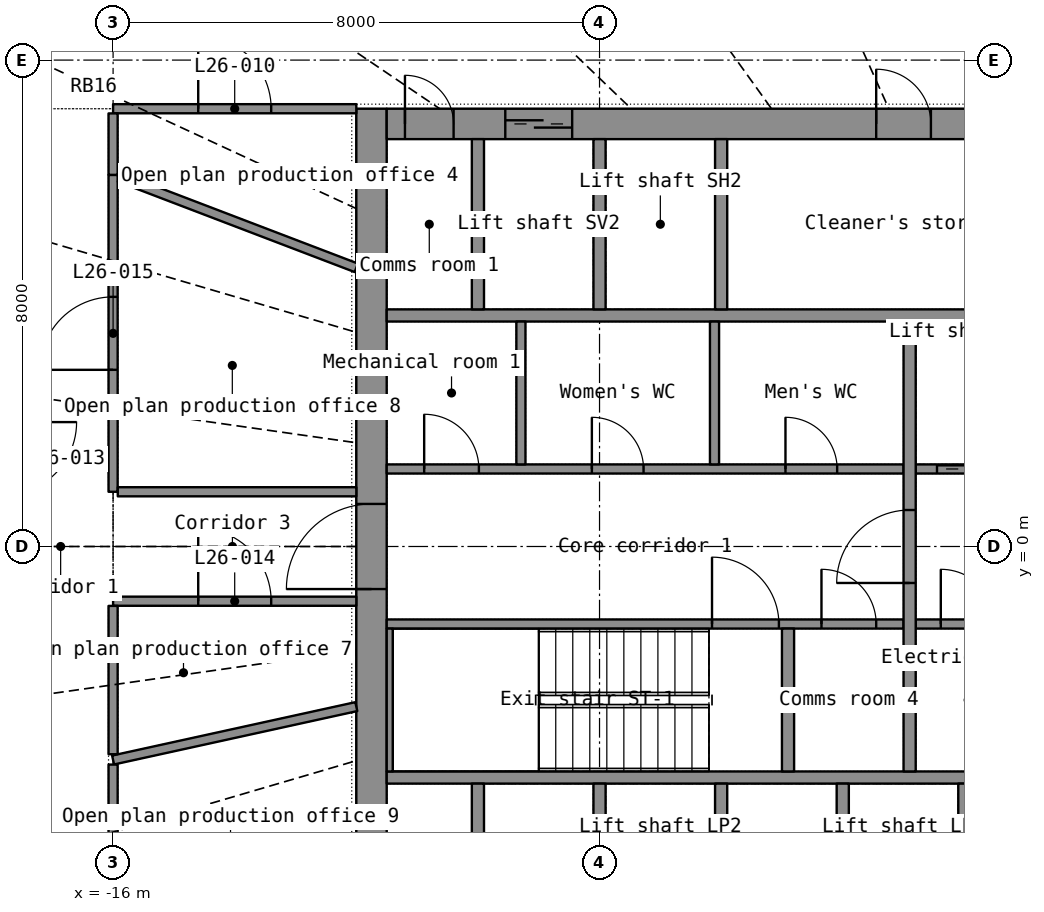
"""IFC4 building model, lengths in metres.
Left out: names, types, materials, properties, quantities, classifications, styles, units other than length and angle.
Written with IfcOpenShell. Run it as: python <this file> out.ifc"""

import sys

from ifc_helpers import new_model, si_unit, direction, frame, frame_2d, origin, place, context, subcontext, project, spatial, rectangle, extrude, element, fill, save


model = new_model("IFC4")
c1 = context("Model", 3, precision=1e-05, world=origin(), true_north=direction((0.0, 1.0)))
c2 = subcontext(c1, "Body", "Model", "MODEL_VIEW")
j1 = project(units=[si_unit("LENGTHUNIT", "METRE"), si_unit("PLANEANGLEUNIT", "RADIAN")], contexts=[c1])
p1 = place(None, origin())
s1 = spatial("IfcSite", under=j1, at=p1, CompositionType="ELEMENT")
p2 = place(p1, origin())
s2 = spatial("IfcBuilding", under=s1, at=p2, CompositionType="ELEMENT")
p3 = place(p2, frame((0.0, 0.0, 111.9)))
s3 = spatial("IfcBuildingStorey", under=s2, at=p3, CompositionType="ELEMENT", Elevation=111.9)
p4 = place(p3, frame((-11.75, -7.2, 0.0), z_axis=(0.0, 0.0, 1.0), x_axis=(0.0, 1.0, 0.0)))
e1 = element("IfcWall", 1, at=p4, inside=s3, PredefinedType="SHEAR", context=c2, shape_type="SweptSolid", body=[
    extrude(rectangle(XDim=14.4, YDim=0.5, at=frame_2d((7.2, 0.0))), origin(), (0.0, 0.0, 1.0), 3.3),
])
p5 = place(p4, frame((6.5, 0.0, 0.0)))
e2 = element("IfcOpeningElement", 2, at=p5, cuts=e1, PredefinedType="OPENING", context=c2, shape_type="SweptSolid", body=[
    extrude(rectangle(XDim=1.4, YDim=2.2, at=frame_2d((0.7, 1.1))), frame((0.0, 0.26, 0.0), z_axis=(0.0, -1.0, 0.0), x_axis=(1.0, 0.0, 0.0)), (0.0, 0.0, 1.0), 0.52),
])
p6 = place(p3, frame((-11.5, 6.95, 0.0), z_axis=(0.0, 0.0, 1.0), x_axis=(1.0, 0.0, 0.0)))
e3 = element("IfcWall", 3, at=p6, inside=s3, PredefinedType="SHEAR", context=c2, shape_type="SweptSolid", body=[
    extrude(rectangle(XDim=23.0, YDim=0.5, at=frame_2d((11.5, 0.0))), origin(), (0.0, 0.0, 1.0), 3.3),
])
p7 = place(p6, frame((1.95, 0.0, 0.0)))
e4 = element("IfcOpeningElement", 4, at=p7, cuts=e3, PredefinedType="OPENING", context=c2, shape_type="SweptSolid", body=[
    extrude(rectangle(XDim=1.1, YDim=2.2, at=frame_2d((0.55, 1.1))), frame((0.0, 0.26, 0.0), z_axis=(0.0, -1.0, 0.0), x_axis=(1.0, 0.0, 0.0)), (0.0, 0.0, 1.0), 0.52),
])
p8 = place(p6, frame((8.05, 0.0, 0.0)))
e5 = element("IfcOpeningElement", 5, at=p8, cuts=e3, PredefinedType="OPENING", context=c2, shape_type="SweptSolid", body=[
    extrude(rectangle(XDim=0.9, YDim=2.1, at=frame_2d((0.45, 1.05))), frame((0.0, 0.26, 0.0), z_axis=(0.0, -1.0, 0.0), x_axis=(1.0, 0.0, 0.0)), (0.0, 0.0, 1.0), 0.52),
])
p9 = place(p6, frame((13.05, 0.0, 0.0)))
e6 = element("IfcOpeningElement", 6, at=p9, cuts=e3, PredefinedType="OPENING", context=c2, shape_type="SweptSolid", body=[
    extrude(rectangle(XDim=0.9, YDim=2.1, at=frame_2d((0.45, 1.05))), frame((0.0, 0.26, 0.0), z_axis=(0.0, -1.0, 0.0), x_axis=(1.0, 0.0, 0.0)), (0.0, 0.0, 1.0), 0.52),
])
p10 = place(p6, frame((18.05, 0.0, 0.0)))
e7 = element("IfcOpeningElement", 7, at=p10, cuts=e3, PredefinedType="OPENING", context=c2, shape_type="SweptSolid", body=[
    extrude(rectangle(XDim=0.9, YDim=2.1, at=frame_2d((0.45, 1.05))), frame((0.0, 0.26, 0.0), z_axis=(0.0, -1.0, 0.0), x_axis=(1.0, 0.0, 0.0)), (0.0, 0.0, 1.0), 0.52),
])
p11 = place(p6, frame((0.3, 0.0, 0.0)))
e8 = element("IfcOpeningElement", 8, at=p11, cuts=e3, PredefinedType="OPENING", context=c2, shape_type="SweptSolid", body=[
    extrude(rectangle(XDim=0.8, YDim=2.05, at=frame_2d((0.4, 1.025))), frame((0.0, 0.26, 0.0), z_axis=(0.0, -1.0, 0.0), x_axis=(1.0, 0.0, 0.0)), (0.0, 0.0, 1.0), 0.52),
])
p12 = place(p6, frame((21.9, 0.0, 0.0)))
e9 = element("IfcOpeningElement", 9, at=p12, cuts=e3, PredefinedType="OPENING", context=c2, shape_type="SweptSolid", body=[
    extrude(rectangle(XDim=0.8, YDim=2.05, at=frame_2d((0.4, 1.025))), frame((0.0, 0.26, 0.0), z_axis=(0.0, -1.0, 0.0), x_axis=(1.0, 0.0, 0.0)), (0.0, 0.0, 1.0), 0.52),
])
for number, where, z_axis, x_axis in (
    (10, (-11.5, -3.8, 0.0), (0.0, 0.0, 1.0), (1.0, 0.0, 0.0)),
    (11, (-11.5, 3.8, 0.0), (0.0, 0.0, 1.0), (1.0, 0.0, 0.0)),
):
    element("IfcWall", number, at=place(p3, frame(where, z_axis=z_axis, x_axis=x_axis)), inside=s3, PredefinedType="SHEAR", context=c2, shape_type="SweptSolid", body=[
        extrude(rectangle(XDim=23.0, YDim=0.2, at=frame_2d((11.5, 0.0))), origin(), (0.0, 0.0, 1.0), 3.3),
    ])
for number, where, z_axis, x_axis in (
    (12, (-10.0, -6.7, 0.0), (0.0, 0.0, 1.0), (0.0, 1.0, 0.0)),
    (13, (-8.0, -6.7, 0.0), (0.0, 0.0, 1.0), (0.0, 1.0, 0.0)),
    (14, (-6.0, -6.7, 0.0), (0.0, 0.0, 1.0), (0.0, 1.0, 0.0)),
    (15, (-4.0, -6.7, 0.0), (0.0, 0.0, 1.0), (0.0, 1.0, 0.0)),
    (16, (-2.0, -6.7, 0.0), (0.0, 0.0, 1.0), (0.0, 1.0, 0.0)),
    (17, (-10.0, 3.9, 0.0), (0.0, 0.0, 1.0), (0.0, 1.0, 0.0)),
    (18, (-8.0, 3.9, 0.0), (0.0, 0.0, 1.0), (0.0, 1.0, 0.0)),
    (19, (-6.0, 3.9, 0.0), (0.0, 0.0, 1.0), (0.0, 1.0, 0.0)),
):
    element("IfcWall", number, at=place(p3, frame(where, z_axis=z_axis, x_axis=x_axis)), inside=s3, PredefinedType="SHEAR", context=c2, shape_type="SweptSolid", body=[
        extrude(rectangle(XDim=2.8, YDim=0.2, at=frame_2d((1.4, 0.0))), origin(), (0.0, 0.0, 1.0), 3.3),
    ])
p13 = place(p3, frame((-11.5, -1.275, 0.0), z_axis=(0.0, 0.0, 1.0), x_axis=(1.0, 0.0, 0.0)))
e20 = element("IfcWall", 20, at=p13, inside=s3, PredefinedType="SHEAR", context=c2, shape_type="SweptSolid", body=[
    extrude(rectangle(XDim=8.5, YDim=0.15, at=frame_2d((4.25, 0.0))), origin(), (0.0, 0.0, 1.0), 3.3),
])
p14 = place(p13, frame((5.35, 0.0, 0.0)))
e21 = element("IfcOpeningElement", 21, at=p14, cuts=e20, PredefinedType="OPENING", context=c2, shape_type="SweptSolid", body=[
    extrude(rectangle(XDim=1.1, YDim=2.15, at=frame_2d((0.55, 1.075))), frame((0.0, 0.085, 0.0), z_axis=(0.0, -1.0, 0.0), x_axis=(1.0, 0.0, 0.0)), (0.0, 0.0, 1.0), 0.17),
])
p15 = place(p13, frame((7.15, 0.0, 0.0)))
e22 = element("IfcOpeningElement", 22, at=p15, cuts=e20, PredefinedType="OPENING", context=c2, shape_type="SweptSolid", body=[
    extrude(rectangle(XDim=0.9, YDim=2.1, at=frame_2d((0.45, 1.05))), frame((0.0, 0.085, 0.0), z_axis=(0.0, -1.0, 0.0), x_axis=(1.0, 0.0, 0.0)), (0.0, 0.0, 1.0), 0.17),
])
p16 = place(p3, frame((-2.8, -1.275, 0.0), z_axis=(0.0, 0.0, 1.0), x_axis=(1.0, 0.0, 0.0)))
e23 = element("IfcWall", 23, at=p16, inside=s3, PredefinedType="SHEAR", context=c2, shape_type="SweptSolid", body=[
    extrude(rectangle(XDim=5.6, YDim=0.15, at=frame_2d((2.8, 0.0))), origin(), (0.0, 0.0, 1.0), 3.3),
])
p17 = place(p16, frame((4.15, 0.0, 0.0)))
e24 = element("IfcOpeningElement", 24, at=p17, cuts=e23, PredefinedType="OPENING", context=c2, shape_type="SweptSolid", body=[
    extrude(rectangle(XDim=1.1, YDim=2.2, at=frame_2d((0.55, 1.1))), frame((0.0, 0.085, 0.0), z_axis=(0.0, -1.0, 0.0), x_axis=(1.0, 0.0, 0.0)), (0.0, 0.0, 1.0), 0.17),
])
p18 = place(p16, frame((0.413, 0.0, 0.0)))
e25 = element("IfcOpeningElement", 25, at=p18, cuts=e23, PredefinedType="OPENING", context=c2, shape_type="SweptSolid", body=[
    extrude(rectangle(XDim=0.9, YDim=2.1, at=frame_2d((0.45, 1.05))), frame((0.0, 0.085, 0.0), z_axis=(0.0, -1.0, 0.0), x_axis=(1.0, 0.0, 0.0)), (0.0, 0.0, 1.0), 0.17),
])
p19 = place(p16, frame((2.288, 0.0, 0.0)))
e26 = element("IfcOpeningElement", 26, at=p19, cuts=e23, PredefinedType="OPENING", context=c2, shape_type="SweptSolid", body=[
    extrude(rectangle(XDim=0.9, YDim=2.1, at=frame_2d((0.45, 1.05))), frame((0.0, 0.085, 0.0), z_axis=(0.0, -1.0, 0.0), x_axis=(1.0, 0.0, 0.0)), (0.0, 0.0, 1.0), 0.17),
])
p20 = place(p3, frame((-11.5, 1.275, 0.0), z_axis=(0.0, 0.0, 1.0), x_axis=(1.0, 0.0, 0.0)))
e27 = element("IfcWall", 27, at=p20, inside=s3, PredefinedType="PARTITIONING", context=c2, shape_type="SweptSolid", body=[
    extrude(rectangle(XDim=8.5, YDim=0.15, at=frame_2d((4.25, 0.0))), origin(), (0.0, 0.0, 1.0), 3.3),
])
p21 = place(p20, frame((0.616, 0.0, 0.0)))
e28 = element("IfcOpeningElement", 28, at=p21, cuts=e27, PredefinedType="OPENING", context=c2, shape_type="SweptSolid", body=[
    extrude(rectangle(XDim=0.9, YDim=2.1, at=frame_2d((0.45, 1.05))), frame((0.0, 0.085, 0.0), z_axis=(0.0, -1.0, 0.0), x_axis=(1.0, 0.0, 0.0)), (0.0, 0.0, 1.0), 0.17),
])
p22 = place(p20, frame((3.374, 0.0, 0.0)))
e29 = element("IfcOpeningElement", 29, at=p22, cuts=e27, PredefinedType="OPENING", context=c2, shape_type="SweptSolid", body=[
    extrude(rectangle(XDim=0.85, YDim=2.1, at=frame_2d((0.425, 1.05))), frame((0.0, 0.085, 0.0), z_axis=(0.0, -1.0, 0.0), x_axis=(1.0, 0.0, 0.0)), (0.0, 0.0, 1.0), 0.17),
])
p23 = place(p20, frame((6.558, 0.0, 0.0)))
e30 = element("IfcOpeningElement", 30, at=p23, cuts=e27, PredefinedType="OPENING", context=c2, shape_type="SweptSolid", body=[
    extrude(rectangle(XDim=0.85, YDim=2.1, at=frame_2d((0.425, 1.05))), frame((0.0, 0.085, 0.0), z_axis=(0.0, -1.0, 0.0), x_axis=(1.0, 0.0, 0.0)), (0.0, 0.0, 1.0), 0.17),
])
p24 = place(p3, frame((-2.8, 1.275, 0.0), z_axis=(0.0, 0.0, 1.0), x_axis=(1.0, 0.0, 0.0)))
e31 = element("IfcWall", 31, at=p24, inside=s3, PredefinedType="SHEAR", context=c2, shape_type="SweptSolid", body=[
    extrude(rectangle(XDim=5.6, YDim=0.15, at=frame_2d((2.8, 0.0))), origin(), (0.0, 0.0, 1.0), 3.3),
])
p25 = place(p24, frame((0.35, 0.0, 0.0)))
e32 = element("IfcOpeningElement", 32, at=p25, cuts=e31, PredefinedType="OPENING", context=c2, shape_type="SweptSolid", body=[
    extrude(rectangle(XDim=1.1, YDim=2.2, at=frame_2d((0.55, 1.1))), frame((0.0, 0.085, 0.0), z_axis=(0.0, -1.0, 0.0), x_axis=(1.0, 0.0, 0.0)), (0.0, 0.0, 1.0), 0.17),
])
p26 = place(p24, frame((3.35, 0.0, 0.0)))
e33 = element("IfcOpeningElement", 33, at=p26, cuts=e31, PredefinedType="OPENING", context=c2, shape_type="SweptSolid", body=[
    extrude(rectangle(XDim=0.9, YDim=2.1, at=frame_2d((0.45, 1.05))), frame((0.0, 0.085, 0.0), z_axis=(0.0, -1.0, 0.0), x_axis=(1.0, 0.0, 0.0)), (0.0, 0.0, 1.0), 0.17),
])
p27 = place(p3, frame((-2.9, -3.7, 0.0), z_axis=(0.0, 0.0, 1.0), x_axis=(0.0, 1.0, 0.0)))
e34 = element("IfcWall", 34, at=p27, inside=s3, PredefinedType="SHEAR", context=c2, shape_type="SweptSolid", body=[
    extrude(rectangle(XDim=7.4, YDim=0.2, at=frame_2d((3.7, 0.0))), origin(), (0.0, 0.0, 1.0), 3.3),
])
p28 = place(p27, frame((3.1, 0.0, 0.0)))
e35 = element("IfcOpeningElement", 35, at=p28, cuts=e34, PredefinedType="OPENING", context=c2, shape_type="SweptSolid", body=[
    extrude(rectangle(XDim=1.2, YDim=2.2, at=frame_2d((0.6, 1.1))), frame((0.0, 0.11, 0.0), z_axis=(0.0, -1.0, 0.0), x_axis=(1.0, 0.0, 0.0)), (0.0, 0.0, 1.0), 0.22),
])
p29 = place(p3, frame((-11.45, -3.7, 0.0), z_axis=(0.0, 0.0, 1.0), x_axis=(0.0, 1.0, 0.0)))
e36 = element("IfcWall", 36, at=p29, inside=s3, PredefinedType="SHEAR", context=c2, shape_type="SweptSolid", body=[
    extrude(rectangle(XDim=2.35, YDim=0.1, at=frame_2d((1.175, 0.0))), origin(), (0.0, 0.0, 1.0), 3.3),
])
p30 = place(p3, frame((-4.9, -3.7, 0.0), z_axis=(0.0, 0.0, 1.0), x_axis=(0.0, 1.0, 0.0)))
e37 = element("IfcWall", 37, at=p30, inside=s3, PredefinedType="SHEAR", context=c2, shape_type="SweptSolid", body=[
    extrude(rectangle(XDim=2.35, YDim=0.2, at=frame_2d((1.175, 0.0))), origin(), (0.0, 0.0, 1.0), 3.3),
])
for number, where, z_axis, x_axis in (
    (38, (-9.293, 1.35, 0.0), (0.0, 0.0, 1.0), (0.0, 1.0, 0.0)),
    (39, (-6.109, 1.35, 0.0), (0.0, 0.0, 1.0), (0.0, 1.0, 0.0)),
):
    element("IfcWall", number, at=place(p3, frame(where, z_axis=z_axis, x_axis=x_axis)), inside=s3, PredefinedType="PARTITIONING", context=c2, shape_type="SweptSolid", body=[
        extrude(rectangle(XDim=2.35, YDim=0.15, at=frame_2d((1.175, 0.0))), origin(), (0.0, 0.0, 1.0), 3.3),
    ])
p31 = place(p3, frame((-16.0, 0.9, 0.0), z_axis=(0.0, 0.0, 1.0), x_axis=(0.0, 1.0, 0.0)))
e40 = element("IfcWall", 40, at=p31, inside=s3, PredefinedType="PARTITIONING", context=c2, shape_type="SweptSolid", body=[
    extrude(rectangle(XDim=5.211, YDim=0.15, at=frame_2d((2.606, 0.0))), origin(), (0.0, 0.0, 1.0), 2.4),
])
p32 = place(p31, frame((2.006, 0.0, 0.0)))
e41 = element("IfcOpeningElement", 41, at=p32, cuts=e40, PredefinedType="OPENING", context=c2, shape_type="SweptSolid", body=[
    extrude(rectangle(XDim=1.2, YDim=2.2, at=frame_2d((0.6, 1.1))), frame((0.0, 0.085, 0.0), z_axis=(0.0, -1.0, 0.0), x_axis=(1.0, 0.0, 0.0)), (0.0, 0.0, 1.0), 0.17),
])
p33 = place(p3, frame((-15.896, 6.072, 0.0), z_axis=(0.0, 0.0, 1.0), x_axis=(0.934175823, -0.356813021, 0.0)))
e42 = element("IfcWall", 42, at=p33, inside=s3, PredefinedType="PARTITIONING", context=c2, shape_type="SweptSolid", body=[
    extrude(rectangle(XDim=4.171, YDim=0.15, at=frame_2d((2.085, 0.0))), origin(), (0.0, 0.0, 1.0), 2.4),
])
p34 = place(p3, frame((-16.0, -3.512, 0.0), z_axis=(0.0, 0.0, 1.0), x_axis=(0.976750433, 0.214379551, 0.0)))
e43 = element("IfcWall", 43, at=p34, inside=s3, PredefinedType="PARTITIONING", context=c2, shape_type="SweptSolid", body=[
    extrude(rectangle(XDim=4.095, YDim=0.15, at=frame_2d((2.048, 0.0))), origin(), (0.0, 0.0, 1.0), 2.4),
])
p35 = place(p3, frame((-16.0, -0.9, 0.0), z_axis=(0.0, 0.0, 1.0), x_axis=(1.0, 0.0, 0.0)))
e44 = element("IfcWall", 44, at=p35, inside=s3, PredefinedType="PARTITIONING", context=c2, shape_type="SweptSolid", body=[
    extrude(rectangle(XDim=4.0, YDim=0.15, at=frame_2d((2.0, 0.0))), origin(), (0.0, 0.0, 1.0), 2.4),
])
p36 = place(p35, frame((1.4, 0.0, 0.0)))
e45 = element("IfcOpeningElement", 45, at=p36, cuts=e44, PredefinedType="OPENING", context=c2, shape_type="SweptSolid", body=[
    extrude(rectangle(XDim=1.2, YDim=2.2, at=frame_2d((0.6, 1.1))), frame((0.0, 0.085, 0.0), z_axis=(0.0, -1.0, 0.0), x_axis=(1.0, 0.0, 0.0)), (0.0, 0.0, 1.0), 0.17),
])
p37 = place(p3, frame((-16.0, 7.2, 0.0), z_axis=(0.0, 0.0, 1.0), x_axis=(1.0, 0.0, 0.0)))
e46 = element("IfcWall", 46, at=p37, inside=s3, PredefinedType="PARTITIONING", context=c2, shape_type="SweptSolid", body=[
    extrude(rectangle(XDim=4.0, YDim=0.15, at=frame_2d((2.0, 0.0))), origin(), (0.0, 0.0, 1.0), 2.4),
])
p38 = place(p37, frame((1.4, 0.0, 0.0)))
e47 = element("IfcOpeningElement", 47, at=p38, cuts=e46, PredefinedType="OPENING", context=c2, shape_type="SweptSolid", body=[
    extrude(rectangle(XDim=1.2, YDim=2.2, at=frame_2d((0.6, 1.1))), frame((0.0, 0.085, 0.0), z_axis=(0.0, -1.0, 0.0), x_axis=(1.0, 0.0, 0.0)), (0.0, 0.0, 1.0), 0.17),
])
p39 = place(p3, frame((-12.0, 0.9, 0.0), z_axis=(0.0, 0.0, 1.0), x_axis=(-1.0, 0.0, 0.0)))
e48 = element("IfcWall", 48, at=p39, inside=s3, PredefinedType="PARTITIONING", context=c2, shape_type="SweptSolid", body=[
    extrude(rectangle(XDim=3.923, YDim=0.15, at=frame_2d((1.961, 0.0))), origin(), (0.0, 0.0, 1.0), 2.4),
])
p40 = place(p3, frame((-16.0, -7.123, 0.0), z_axis=(0.0, 0.0, 1.0), x_axis=(0.0, 1.0, 0.0)))
e49 = element("IfcWall", 49, at=p40, inside=s3, PredefinedType="PARTITIONING", context=c2, shape_type="SweptSolid", body=[
    extrude(rectangle(XDim=3.536, YDim=0.15, at=frame_2d((1.768, 0.0))), origin(), (0.0, 0.0, 1.0), 2.4),
])
p41 = place(p3, frame((-16.0, -3.417, 0.0), z_axis=(0.0, 0.0, 1.0), x_axis=(0.0, 1.0, 0.0)))
e50 = element("IfcWall", 50, at=p41, inside=s3, PredefinedType="PARTITIONING", context=c2, shape_type="SweptSolid", body=[
    extrude(rectangle(XDim=2.439, YDim=0.15, at=frame_2d((1.22, 0.0))), origin(), (0.0, 0.0, 1.0), 2.4),
])
p42 = place(p3, frame((-16.0, 6.112, 0.0), z_axis=(0.0, 0.0, 1.0), x_axis=(0.0, 1.0, 0.0)))
e51 = element("IfcWall", 51, at=p42, inside=s3, PredefinedType="PARTITIONING", context=c2, shape_type="SweptSolid", body=[
    extrude(rectangle(XDim=1.011, YDim=0.15, at=frame_2d((0.505, 0.0))), origin(), (0.0, 0.0, 1.0), 2.4),
])
p43 = place(p7, origin())
e52 = element("IfcDoor", 52, at=p43, inside=s3, OperationType="DOUBLE_DOOR_SLIDING", PredefinedType="DOOR", context=c2, shape_type="SweptSolid", body=[
    extrude(rectangle(XDim=1.1, YDim=2.2, at=frame_2d((0.55, 1.1))), frame((0.0, 0.025, 0.0), z_axis=(0.0, -1.0, 0.0), x_axis=(1.0, 0.0, 0.0)), (0.0, 0.0, 1.0), 0.05),
])
fill(e4, e52)
p44 = place(p8, origin())
e53 = element("IfcDoor", 53, at=p44, inside=s3, OperationType="SINGLE_SWING_LEFT", PredefinedType="DOOR", context=c2, shape_type="SweptSolid", body=[
    extrude(rectangle(XDim=0.9, YDim=2.1, at=frame_2d((0.45, 1.05))), frame((0.0, 0.025, 0.0), z_axis=(0.0, -1.0, 0.0), x_axis=(1.0, 0.0, 0.0)), (0.0, 0.0, 1.0), 0.05),
])
fill(e5, e53)
p45 = place(p11, origin())
e54 = element("IfcDoor", 54, at=p45, inside=s3, OperationType="SINGLE_SWING_LEFT", PredefinedType="DOOR", context=c2, shape_type="SweptSolid", body=[
    extrude(rectangle(XDim=0.8, YDim=2.05, at=frame_2d((0.4, 1.025))), frame((0.0, 0.025, 0.0), z_axis=(0.0, -1.0, 0.0), x_axis=(1.0, 0.0, 0.0)), (0.0, 0.0, 1.0), 0.05),
])
fill(e8, e54)
p46 = place(p5, origin())
e55 = element("IfcDoor", 55, at=p46, inside=s3, OperationType="DOUBLE_DOOR_SINGLE_SWING", PredefinedType="DOOR", context=c2, shape_type="SweptSolid", body=[
    extrude(rectangle(XDim=1.4, YDim=2.2, at=frame_2d((0.7, 1.1))), frame((0.0, 0.025, 0.0), z_axis=(0.0, -1.0, 0.0), x_axis=(1.0, 0.0, 0.0)), (0.0, 0.0, 1.0), 0.05),
])
fill(e2, e55)
p47 = place(p28, origin())
e56 = element("IfcDoor", 56, at=p47, inside=s3, OperationType="SINGLE_SWING_LEFT", PredefinedType="DOOR", context=c2, shape_type="SweptSolid", body=[
    extrude(rectangle(XDim=1.2, YDim=2.2, at=frame_2d((0.6, 1.1))), frame((0.0, 0.025, 0.0), z_axis=(0.0, -1.0, 0.0), x_axis=(1.0, 0.0, 0.0)), (0.0, 0.0, 1.0), 0.05),
])
fill(e35, e56)
p48 = place(p25, origin())
e57 = element("IfcDoor", 57, at=p48, inside=s3, OperationType="DOUBLE_DOOR_SLIDING", PredefinedType="DOOR", context=c2, shape_type="SweptSolid", body=[
    extrude(rectangle(XDim=1.1, YDim=2.2, at=frame_2d((0.55, 1.1))), frame((0.0, 0.025, 0.0), z_axis=(0.0, -1.0, 0.0), x_axis=(1.0, 0.0, 0.0)), (0.0, 0.0, 1.0), 0.05),
])
fill(e32, e57)
p49 = place(p14, origin())
e58 = element("IfcDoor", 58, at=p49, inside=s3, OperationType="SINGLE_SWING_LEFT", PredefinedType="DOOR", context=c2, shape_type="SweptSolid", body=[
    extrude(rectangle(XDim=1.1, YDim=2.15, at=frame_2d((0.55, 1.075))), frame((0.0, 0.025, 0.0), z_axis=(0.0, -1.0, 0.0), x_axis=(1.0, 0.0, 0.0)), (0.0, 0.0, 1.0), 0.05),
])
fill(e21, e58)
p50 = place(p21, origin())
e59 = element("IfcDoor", 59, at=p50, inside=s3, OperationType="SINGLE_SWING_LEFT", PredefinedType="DOOR", context=c2, shape_type="SweptSolid", body=[
    extrude(rectangle(XDim=0.9, YDim=2.1, at=frame_2d((0.45, 1.05))), frame((0.0, 0.025, 0.0), z_axis=(0.0, -1.0, 0.0), x_axis=(1.0, 0.0, 0.0)), (0.0, 0.0, 1.0), 0.05),
])
fill(e28, e59)
p51 = place(p22, origin())
e60 = element("IfcDoor", 60, at=p51, inside=s3, OperationType="SINGLE_SWING_LEFT", PredefinedType="DOOR", context=c2, shape_type="SweptSolid", body=[
    extrude(rectangle(XDim=0.85, YDim=2.1, at=frame_2d((0.425, 1.05))), frame((0.0, 0.025, 0.0), z_axis=(0.0, -1.0, 0.0), x_axis=(1.0, 0.0, 0.0)), (0.0, 0.0, 1.0), 0.05),
])
fill(e29, e60)
p52 = place(p23, origin())
e61 = element("IfcDoor", 61, at=p52, inside=s3, OperationType="SINGLE_SWING_LEFT", PredefinedType="DOOR", context=c2, shape_type="SweptSolid", body=[
    extrude(rectangle(XDim=0.85, YDim=2.1, at=frame_2d((0.425, 1.05))), frame((0.0, 0.025, 0.0), z_axis=(0.0, -1.0, 0.0), x_axis=(1.0, 0.0, 0.0)), (0.0, 0.0, 1.0), 0.05),
])
fill(e30, e61)
p53 = place(p18, origin())
e62 = element("IfcDoor", 62, at=p53, inside=s3, OperationType="SINGLE_SWING_LEFT", PredefinedType="DOOR", context=c2, shape_type="SweptSolid", body=[
    extrude(rectangle(XDim=0.9, YDim=2.1, at=frame_2d((0.45, 1.05))), frame((0.0, 0.025, 0.0), z_axis=(0.0, -1.0, 0.0), x_axis=(1.0, 0.0, 0.0)), (0.0, 0.0, 1.0), 0.05),
])
fill(e25, e62)
p54 = place(p15, origin())
e63 = element("IfcDoor", 63, at=p54, inside=s3, OperationType="SINGLE_SWING_LEFT", PredefinedType="DOOR", context=c2, shape_type="SweptSolid", body=[
    extrude(rectangle(XDim=0.9, YDim=2.1, at=frame_2d((0.45, 1.05))), frame((0.0, 0.025, 0.0), z_axis=(0.0, -1.0, 0.0), x_axis=(1.0, 0.0, 0.0)), (0.0, 0.0, 1.0), 0.05),
])
fill(e22, e63)
p55 = place(p38, origin())
e64 = element("IfcDoor", 64, at=p55, inside=s3, OperationType="DOUBLE_DOOR_SINGLE_SWING", PredefinedType="DOOR", context=c2, shape_type="SweptSolid", body=[
    extrude(rectangle(XDim=1.2, YDim=2.2, at=frame_2d((0.6, 1.1))), frame((0.0, 0.025, 0.0), z_axis=(0.0, -1.0, 0.0), x_axis=(1.0, 0.0, 0.0)), (0.0, 0.0, 1.0), 0.05),
])
fill(e47, e64)
p56 = place(p36, origin())
e65 = element("IfcDoor", 65, at=p56, inside=s3, OperationType="DOUBLE_DOOR_SINGLE_SWING", PredefinedType="DOOR", context=c2, shape_type="SweptSolid", body=[
    extrude(rectangle(XDim=1.2, YDim=2.2, at=frame_2d((0.6, 1.1))), frame((0.0, 0.025, 0.0), z_axis=(0.0, -1.0, 0.0), x_axis=(1.0, 0.0, 0.0)), (0.0, 0.0, 1.0), 0.05),
])
fill(e45, e65)
p57 = place(p32, origin())
e66 = element("IfcDoor", 66, at=p57, inside=s3, OperationType="DOUBLE_DOOR_SINGLE_SWING", PredefinedType="DOOR", context=c2, shape_type="SweptSolid", body=[
    extrude(rectangle(XDim=1.2, YDim=2.2, at=frame_2d((0.6, 1.1))), frame((0.0, 0.025, 0.0), z_axis=(0.0, -1.0, 0.0), x_axis=(1.0, 0.0, 0.0)), (0.0, 0.0, 1.0), 0.05),
])
fill(e41, e66)
save(model, sys.argv[1])
